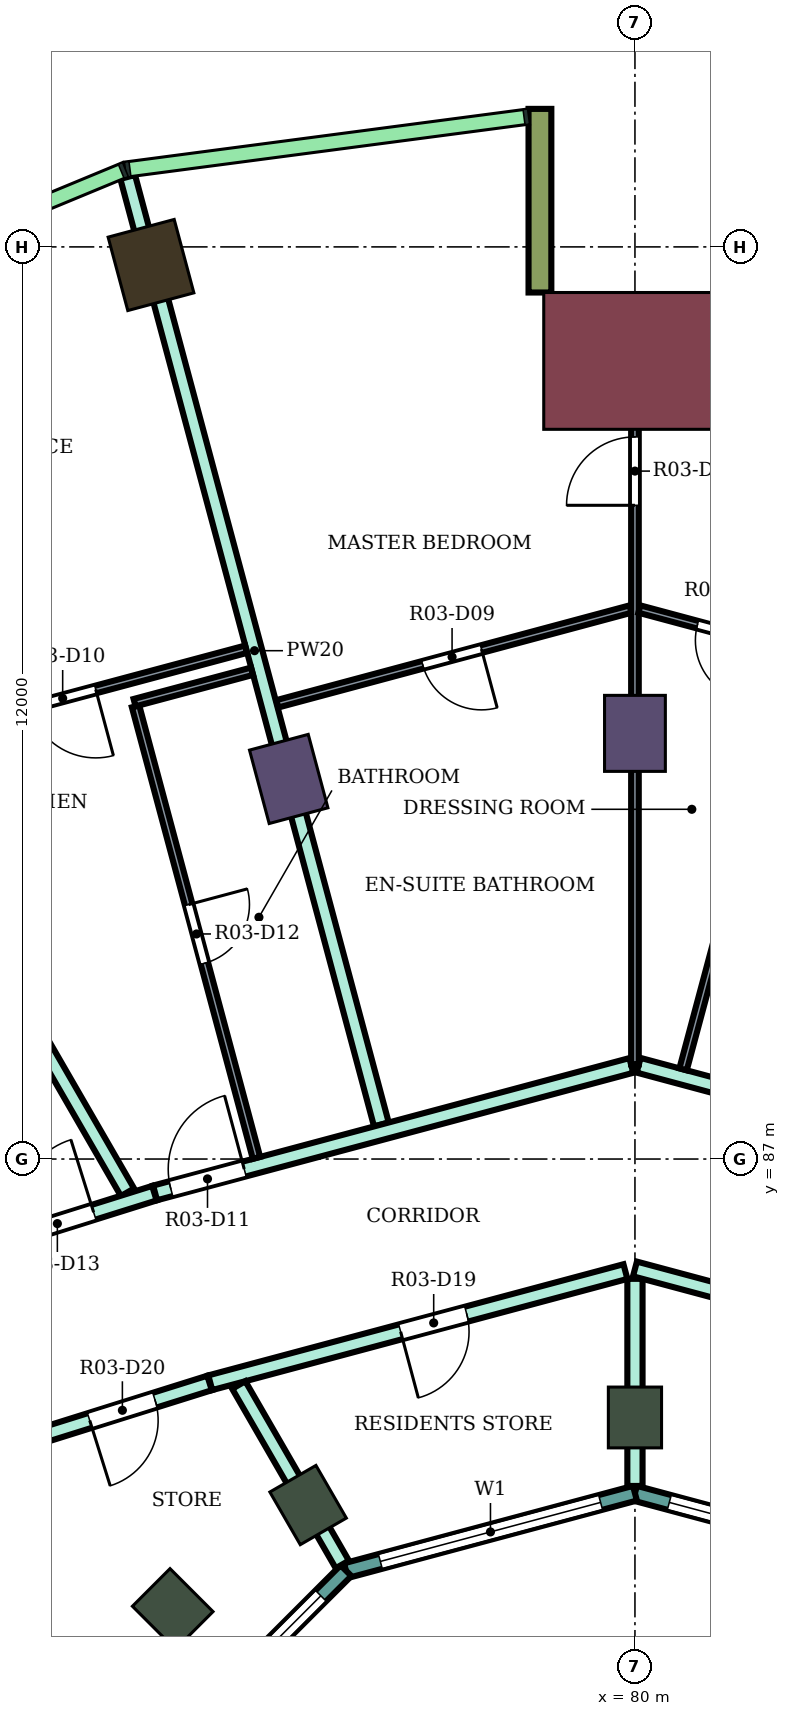
"""IFC4 building model, lengths in metres.
Left out: names, types, materials, properties, quantities, classifications, styles, units other than length and angle.
Written with IfcOpenShell. Run it as: python <this file> out.ifc"""

import sys

from ifc_helpers import new_model, si_unit, direction, frame, frame_2d, origin, origin_2d, place, context, subcontext, project, spatial, rectangle, extrude, element, fill, save


model = new_model("IFC4")
c1 = context("Model", 3, precision=1e-05, world=origin(), true_north=direction((0.0, 1.0)))
c2 = subcontext(c1, "Body", "Model", "MODEL_VIEW")
j1 = project(units=[si_unit("LENGTHUNIT", "METRE"), si_unit("PLANEANGLEUNIT", "RADIAN")], contexts=[c1])
p1 = place(None, origin())
s1 = spatial("IfcSite", under=j1, at=p1, CompositionType="ELEMENT")
p2 = place(p1, origin())
s2 = spatial("IfcBuilding", under=s1, at=p2, CompositionType="ELEMENT")
p3 = place(p2, frame((0.0, 0.0, 186.4)))
s3 = spatial("IfcBuildingStorey", under=s2, at=p3, CompositionType="ELEMENT", Elevation=186.4)
p4 = place(p3, frame((73.633, 98.762, 0.0), z_axis=(0.0, 0.0, 1.0), x_axis=(-0.258819045103, 0.965925826289, 0.0)))
e1 = element("IfcColumn", 1, at=p4, inside=s3, PredefinedType="COLUMN", context=c2, shape_type="SweptSolid", body=[
    extrude(rectangle(XDim=1.0, YDim=0.9, at=origin_2d()), origin(), (0.0, 0.0, 1.0), 4.1),
])
for number, where, z_axis, x_axis in (
    (2, (80.0, 92.6, 0.0), (0.0, 0.0, 1.0), (0.0, 1.0, 0.0)),
    (3, (75.445, 92.0, 0.0), (0.0, 0.0, 1.0), (-0.259, 0.966, 0.0)),
):
    element("IfcColumn", number, at=place(p3, frame(where, z_axis=z_axis, x_axis=x_axis)), inside=s3, PredefinedType="COLUMN", context=c2, shape_type="SweptSolid", body=[
        extrude(rectangle(XDim=1.0, YDim=0.8, at=origin_2d()), origin(), (0.0, 0.0, 1.0), 4.1),
    ])
for number, where, z_axis, x_axis in (
    (4, (80.0, 83.6, 0.0), (0.0, 0.0, 1.0), (0.0, 1.0, 0.0)),
    (5, (75.7, 82.448, 0.0), (0.0, 0.0, 1.0), (-0.5, 0.866, 0.0)),
    (6, (73.919, 81.081, 0.0), (0.0, 0.0, 1.0), (-0.707, 0.707, 0.0)),
):
    element("IfcColumn", number, at=place(p3, frame(where, z_axis=z_axis, x_axis=x_axis)), inside=s3, PredefinedType="COLUMN", context=c2, shape_type="SweptSolid", body=[
        extrude(rectangle(XDim=0.8, YDim=0.7, at=origin_2d()), origin(), (0.0, 0.0, 1.0), 4.1),
    ])
p5 = place(p3, frame((80.0, 97.5, 0.0), z_axis=(0.0, 0.0, 1.0), x_axis=(0.0, 1.0, 0.0)))
e7 = element("IfcColumn", 7, at=p5, inside=s3, PredefinedType="COLUMN", context=c2, shape_type="SweptSolid", body=[
    extrude(rectangle(XDim=1.8, YDim=2.4, at=origin_2d()), origin(), (0.0, 0.0, 1.0), 4.1),
])
p6 = place(p3, frame((78.75, 98.4, 0.0), z_axis=(0.0, 0.0, 1.0), x_axis=(0.0, 1.0, 0.0)))
e8 = element("IfcWall", 8, at=p6, inside=s3, PredefinedType="NOTDEFINED", context=c2, shape_type="SweptSolid", body=[
    extrude(rectangle(XDim=2.416, YDim=0.3, at=frame_2d((1.208, 0.0))), origin(), (0.0, 0.0, 1.0), 4.1),
])
p7 = place(p3, frame((83.802, 81.585, 0.0), z_axis=(0.0, 0.0, 1.0), x_axis=(-0.965933654434, 0.258789828301, 0.0)))
e9 = element("IfcWall", 9, at=p7, inside=s3, PredefinedType="NOTDEFINED", context=c2, shape_type="SweptSolid", body=[
    extrude(rectangle(XDim=3.936, YDim=0.2, at=frame_2d((1.968, 0.0))), origin(), (0.0, 0.0, 1.0), 4.1),
])
p8 = place(p7, frame((0.468, 0.0, 0.9)))
e10 = element("IfcOpeningElement", 10, at=p8, cuts=e9, PredefinedType="OPENING", context=c2, shape_type="SweptSolid", body=[
    extrude(rectangle(XDim=3.0, YDim=2.3, at=frame_2d((1.5, 1.15))), frame((0.0, 0.11, 0.0), z_axis=(0.0, -1.0, 0.0), x_axis=(1.0, 0.0, 0.0)), (0.0, 0.0, 1.0), 0.22),
])
p9 = place(p3, frame((80.0, 82.604, 0.0), z_axis=(0.0, 0.0, 1.0), x_axis=(-0.965933654434, -0.258789828301, 0.0)))
e11 = element("IfcWall", 11, at=p9, inside=s3, PredefinedType="NOTDEFINED", context=c2, shape_type="SweptSolid", body=[
    extrude(rectangle(XDim=3.936, YDim=0.2, at=frame_2d((1.968, 0.0))), origin(), (0.0, 0.0, 1.0), 4.1),
])
p10 = place(p9, frame((0.468, 0.0, 0.9)))
e12 = element("IfcOpeningElement", 12, at=p10, cuts=e11, PredefinedType="OPENING", context=c2, shape_type="SweptSolid", body=[
    extrude(rectangle(XDim=3.0, YDim=2.3, at=frame_2d((1.5, 1.15))), frame((0.0, 0.11, 0.0), z_axis=(0.0, -1.0, 0.0), x_axis=(1.0, 0.0, 0.0)), (0.0, 0.0, 1.0), 0.22),
])
p11 = place(p3, frame((76.198, 81.585, 0.0), z_axis=(0.0, 0.0, 1.0), x_axis=(-0.707106781187, -0.707106781187, 0.0)))
e13 = element("IfcWall", 13, at=p11, inside=s3, PredefinedType="NOTDEFINED", context=c2, shape_type="SweptSolid", body=[
    extrude(rectangle(XDim=3.936, YDim=0.2, at=frame_2d((1.968, 0.0))), origin(), (0.0, 0.0, 1.0), 4.1),
])
p12 = place(p11, frame((0.468, 0.0, 0.9)))
e14 = element("IfcOpeningElement", 14, at=p12, cuts=e13, PredefinedType="OPENING", context=c2, shape_type="SweptSolid", body=[
    extrude(rectangle(XDim=3.0, YDim=2.3, at=frame_2d((1.5, 1.15))), frame((0.0, 0.11, 0.0), z_axis=(0.0, -1.0, 0.0), x_axis=(1.0, 0.0, 0.0)), (0.0, 0.0, 1.0), 0.22),
])
p13 = place(p3, frame((67.102, 97.342, 0.0), z_axis=(0.0, 0.0, 1.0), x_axis=(0.499940938316, -0.866059500378, 0.0)))
e15 = element("IfcWall", 15, at=p13, inside=s3, PredefinedType="PARTITIONING", context=c2, shape_type="SweptSolid", body=[
    extrude(rectangle(XDim=12.446, YDim=0.2, at=frame_2d((6.223, 0.0))), origin(), (0.0, 0.0, 1.0), 3.65),
])
p14 = place(p3, frame((68.2, 84.833, 0.0), z_axis=(0.0, 0.0, 1.0), x_axis=(0.954204109499, 0.299156342762, 0.0)))
e16 = element("IfcWall", 16, at=p14, inside=s3, PredefinedType="PARTITIONING", context=c2, shape_type="SweptSolid", body=[
    extrude(rectangle(XDim=5.74, YDim=0.2, at=frame_2d((2.87, 0.0))), origin(), (0.0, 0.0, 1.0), 3.65),
])
p15 = place(p14, frame((3.903, 0.0, 0.0)))
e17 = element("IfcOpeningElement", 17, at=p15, cuts=e16, PredefinedType="OPENING", context=c2, shape_type="SweptSolid", body=[
    extrude(rectangle(XDim=1.0, YDim=2.1, at=frame_2d((0.5, 1.05))), frame((0.0, 0.11, 0.0), z_axis=(0.0, -1.0, 0.0), x_axis=(1.0, 0.0, 0.0)), (0.0, 0.0, 1.0), 0.22),
])
p16 = place(p3, frame((72.1, 83.332, 0.0), z_axis=(0.0, 0.0, 1.0), x_axis=(0.954233106619, 0.299063836383, 0.0)))
e18 = element("IfcWall", 18, at=p16, inside=s3, PredefinedType="PARTITIONING", context=c2, shape_type="SweptSolid", body=[
    extrude(rectangle(XDim=2.414, YDim=0.2, at=frame_2d((1.207, 0.0))), origin(), (0.0, 0.0, 1.0), 3.65),
])
p17 = place(p16, frame((0.762, 0.0, 0.0)))
e19 = element("IfcOpeningElement", 19, at=p17, cuts=e18, PredefinedType="OPENING", context=c2, shape_type="SweptSolid", body=[
    extrude(rectangle(XDim=0.9, YDim=2.1, at=frame_2d((0.45, 1.05))), frame((0.0, 0.11, 0.0), z_axis=(0.0, -1.0, 0.0), x_axis=(1.0, 0.0, 0.0)), (0.0, 0.0, 1.0), 0.22),
])
p18 = place(p3, frame((73.326, 99.92, 0.0), z_axis=(0.0, 0.0, 1.0), x_axis=(0.258652861824, -0.965970339643, 0.0)))
e20 = element("IfcWall", 20, at=p18, inside=s3, PredefinedType="PARTITIONING", context=c2, shape_type="SweptSolid", body=[
    extrude(rectangle(XDim=12.904, YDim=0.2, at=frame_2d((6.452, 0.0))), origin(), (0.0, 0.0, 1.0), 3.65),
])
p19 = place(p3, frame((73.687, 86.554, 0.0), z_axis=(0.0, 0.0, 1.0), x_axis=(0.965992724769, 0.258569247387, 0.0)))
e21 = element("IfcWall", 21, at=p19, inside=s3, PredefinedType="PARTITIONING", context=c2, shape_type="SweptSolid", body=[
    extrude(rectangle(XDim=6.486, YDim=0.2, at=frame_2d((3.243, 0.0))), origin(), (0.0, 0.0, 1.0), 3.65),
])
p20 = place(p19, frame((0.214, 0.0, 0.0)))
e22 = element("IfcOpeningElement", 22, at=p20, cuts=e21, PredefinedType="OPENING", context=c2, shape_type="SweptSolid", body=[
    extrude(rectangle(XDim=1.0, YDim=2.1, at=frame_2d((0.5, 1.05))), frame((0.0, 0.11, 0.0), z_axis=(0.0, -1.0, 0.0), x_axis=(1.0, 0.0, 0.0)), (0.0, 0.0, 1.0), 0.22),
])
p21 = place(p3, frame((74.413, 84.057, 0.0), z_axis=(0.0, 0.0, 1.0), x_axis=(0.965972135939, 0.258646153246, 0.0)))
e23 = element("IfcWall", 23, at=p21, inside=s3, PredefinedType="PARTITIONING", context=c2, shape_type="SweptSolid", body=[
    extrude(rectangle(XDim=5.654, YDim=0.2, at=frame_2d((2.827, 0.0))), origin(), (0.0, 0.0, 1.0), 3.65),
])
p22 = place(p21, frame((2.593, 0.0, 0.0)))
e24 = element("IfcOpeningElement", 24, at=p22, cuts=e23, PredefinedType="OPENING", context=c2, shape_type="SweptSolid", body=[
    extrude(rectangle(XDim=0.9, YDim=2.1, at=frame_2d((0.45, 1.05))), frame((0.0, 0.11, 0.0), z_axis=(0.0, -1.0, 0.0), x_axis=(1.0, 0.0, 0.0)), (0.0, 0.0, 1.0), 0.22),
])
p23 = place(p3, frame((74.788, 84.027, 0.0), z_axis=(0.0, 0.0, 1.0), x_axis=(0.499905962189, -0.866079689733, 0.0)))
e25 = element("IfcWall", 25, at=p23, inside=s3, PredefinedType="PARTITIONING", context=c2, shape_type="SweptSolid", body=[
    extrude(rectangle(XDim=2.726, YDim=0.2, at=frame_2d((1.363, 0.0))), origin(), (0.0, 0.0, 1.0), 3.65),
])
p24 = place(p3, frame((80.0, 82.699, 0.0), z_axis=(0.0, 0.0, 1.0), x_axis=(0.0, 1.0, 0.0)))
e26 = element("IfcWall", 26, at=p24, inside=s3, PredefinedType="PARTITIONING", context=c2, shape_type="SweptSolid", body=[
    extrude(rectangle(XDim=2.725, YDim=0.2, at=frame_2d((1.363, 0.0))), origin(), (0.0, 0.0, 1.0), 3.65),
])
p25 = place(p3, frame((80.0, 85.554, 0.0), z_axis=(0.0, 0.0, 1.0), x_axis=(0.965928989968, -0.258807237802, 0.0)))
e27 = element("IfcWall", 27, at=p25, inside=s3, PredefinedType="PARTITIONING", context=c2, shape_type="SweptSolid", body=[
    extrude(rectangle(XDim=5.774, YDim=0.2, at=frame_2d((2.887, 0.0))), origin(), (0.0, 0.0, 1.0), 3.65),
])
p26 = place(p25, frame((2.292, 0.0, 0.0)))
e28 = element("IfcOpeningElement", 28, at=p26, cuts=e27, PredefinedType="OPENING", context=c2, shape_type="SweptSolid", body=[
    extrude(rectangle(XDim=0.9, YDim=2.1, at=frame_2d((0.45, 1.05))), frame((0.0, 0.11, 0.0), z_axis=(0.0, -1.0, 0.0), x_axis=(1.0, 0.0, 0.0)), (0.0, 0.0, 1.0), 0.22),
])
p27 = place(p3, frame((80.048, 88.233, 0.0), z_axis=(0.0, 0.0, 1.0), x_axis=(0.965787353661, -0.259335280109, 0.0)))
e29 = element("IfcWall", 29, at=p27, inside=s3, PredefinedType="PARTITIONING", context=c2, shape_type="SweptSolid", body=[
    extrude(rectangle(XDim=6.476, YDim=0.2, at=frame_2d((3.238, 0.0))), origin(), (0.0, 0.0, 1.0), 3.65),
])
p28 = place(p27, frame((4.936, 0.0, 0.0)))
e30 = element("IfcOpeningElement", 30, at=p28, cuts=e29, PredefinedType="OPENING", context=c2, shape_type="SweptSolid", body=[
    extrude(rectangle(XDim=1.0, YDim=2.1, at=frame_2d((0.5, 1.05))), frame((0.0, 0.11, 0.0), z_axis=(0.0, -1.0, 0.0), x_axis=(1.0, 0.0, 0.0)), (0.0, 0.0, 1.0), 0.22),
])
p29 = place(p3, frame((70.067, 92.417, 0.0), z_axis=(0.0, 0.0, 1.0), x_axis=(0.965982566978, 0.258607193045, 0.0)))
e31 = element("IfcWall", 31, at=p29, inside=s3, PredefinedType="PARTITIONING", context=c2, shape_type="SweptSolid", body=[
    extrude(rectangle(XDim=4.987, YDim=0.1, at=frame_2d((2.493, 0.0))), origin(), (0.0, 0.0, 1.0), 3.65),
])
p30 = place(p29, frame((2.038, 0.0, 0.0)))
e32 = element("IfcOpeningElement", 32, at=p30, cuts=e31, PredefinedType="OPENING", context=c2, shape_type="SweptSolid", body=[
    extrude(rectangle(XDim=0.9, YDim=2.1, at=frame_2d((0.45, 1.05))), frame((0.0, 0.06, 0.0), z_axis=(0.0, -1.0, 0.0), x_axis=(1.0, 0.0, 0.0)), (0.0, 0.0, 1.0), 0.12),
])
p31 = place(p3, frame((73.43, 92.956, 0.0), z_axis=(0.0, 0.0, 1.0), x_axis=(0.258707643808, -0.965955669291, 0.0)))
e33 = element("IfcWall", 33, at=p31, inside=s3, PredefinedType="PARTITIONING", context=c2, shape_type="SweptSolid", body=[
    extrude(rectangle(XDim=6.15, YDim=0.1, at=frame_2d((3.075, 0.0))), origin(), (0.0, 0.0, 1.0), 3.65),
])
p32 = place(p31, frame((2.7, 0.0, 0.0)))
e34 = element("IfcOpeningElement", 34, at=p32, cuts=e33, PredefinedType="OPENING", context=c2, shape_type="SweptSolid", body=[
    extrude(rectangle(XDim=0.8, YDim=2.1, at=frame_2d((0.4, 1.05))), frame((0.0, 0.06, 0.0), z_axis=(0.0, -1.0, 0.0), x_axis=(1.0, 0.0, 0.0)), (0.0, 0.0, 1.0), 0.12),
])
p33 = place(p3, frame((73.417, 93.004, 0.0), z_axis=(0.0, 0.0, 1.0), x_axis=(0.966062421459, 0.258308725839, 0.0)))
e35 = element("IfcWall", 35, at=p33, inside=s3, PredefinedType="PARTITIONING", context=c2, shape_type="SweptSolid", body=[
    extrude(rectangle(XDim=1.599, YDim=0.1, at=frame_2d((0.8, 0.0))), origin(), (0.0, 0.0, 1.0), 3.65),
])
p34 = place(p3, frame((75.295, 92.989, 0.0), z_axis=(0.0, 0.0, 1.0), x_axis=(0.965829517501, 0.259178207271, 0.0)))
e36 = element("IfcWall", 36, at=p34, inside=s3, PredefinedType="PARTITIONING", context=c2, shape_type="SweptSolid", body=[
    extrude(rectangle(XDim=4.812, YDim=0.1, at=frame_2d((2.406, 0.0))), origin(), (0.0, 0.0, 1.0), 3.65),
])
p35 = place(p34, frame((1.981, 0.0, 0.0)))
e37 = element("IfcOpeningElement", 37, at=p35, cuts=e36, PredefinedType="OPENING", context=c2, shape_type="SweptSolid", body=[
    extrude(rectangle(XDim=0.8, YDim=2.1, at=frame_2d((0.4, 1.05))), frame((0.0, 0.06, 0.0), z_axis=(0.0, -1.0, 0.0), x_axis=(1.0, 0.0, 0.0)), (0.0, 0.0, 1.0), 0.12),
])
p36 = place(p3, frame((80.0, 88.246, 0.0), z_axis=(0.0, 0.0, 1.0), x_axis=(0.0, 1.0, 0.0)))
e38 = element("IfcWall", 38, at=p36, inside=s3, PredefinedType="PARTITIONING", context=c2, shape_type="SweptSolid", body=[
    extrude(rectangle(XDim=9.954, YDim=0.1, at=frame_2d((4.977, 0.0))), origin(), (0.0, 0.0, 1.0), 3.65),
])
p37 = place(p36, frame((7.354, 0.0, 0.0)))
e39 = element("IfcOpeningElement", 39, at=p37, cuts=e38, PredefinedType="OPENING", context=c2, shape_type="SweptSolid", body=[
    extrude(rectangle(XDim=0.9, YDim=2.1, at=frame_2d((0.45, 1.05))), frame((0.0, 0.06, 0.0), z_axis=(0.0, -1.0, 0.0), x_axis=(1.0, 0.0, 0.0)), (0.0, 0.0, 1.0), 0.12),
])
p38 = place(p3, frame((80.058, 94.235, 0.0), z_axis=(0.0, 0.0, 1.0), x_axis=(0.965831212389, -0.259171891173, 0.0)))
e40 = element("IfcWall", 40, at=p38, inside=s3, PredefinedType="PARTITIONING", context=c2, shape_type="SweptSolid", body=[
    extrude(rectangle(XDim=4.872, YDim=0.1, at=frame_2d((2.436, 0.0))), origin(), (0.0, 0.0, 1.0), 3.65),
])
p39 = place(p38, frame((0.792, 0.0, 0.0)))
e41 = element("IfcOpeningElement", 41, at=p39, cuts=e40, PredefinedType="OPENING", context=c2, shape_type="SweptSolid", body=[
    extrude(rectangle(XDim=0.8, YDim=2.1, at=frame_2d((0.4, 1.05))), frame((0.0, 0.06, 0.0), z_axis=(0.0, -1.0, 0.0), x_axis=(1.0, 0.0, 0.0)), (0.0, 0.0, 1.0), 0.12),
])
p40 = place(p3, frame((80.633, 88.18, 0.0), z_axis=(0.0, 0.0, 1.0), x_axis=(0.25898304477, 0.965881867788, 0.0)))
e42 = element("IfcWall", 42, at=p40, inside=s3, PredefinedType="PARTITIONING", context=c2, shape_type="SweptSolid", body=[
    extrude(rectangle(XDim=5.65, YDim=0.1, at=frame_2d((2.825, 0.0))), origin(), (0.0, 0.0, 1.0), 3.65),
])
p41 = place(p8, origin())
e43 = element("IfcWindow", 43, at=p41, inside=s3, PartitioningType="SINGLE_PANEL", PredefinedType="WINDOW", context=c2, shape_type="SweptSolid", body=[
    extrude(rectangle(XDim=3.0, YDim=2.3, at=frame_2d((1.5, 1.15))), frame((0.0, 0.03, 0.0), z_axis=(0.0, -1.0, 0.0), x_axis=(1.0, 0.0, 0.0)), (0.0, 0.0, 1.0), 0.06),
])
fill(e10, e43)
p42 = place(p10, origin())
e44 = element("IfcWindow", 44, at=p42, inside=s3, PartitioningType="SINGLE_PANEL", PredefinedType="WINDOW", context=c2, shape_type="SweptSolid", body=[
    extrude(rectangle(XDim=3.0, YDim=2.3, at=frame_2d((1.5, 1.15))), frame((0.0, 0.03, 0.0), z_axis=(0.0, -1.0, 0.0), x_axis=(1.0, 0.0, 0.0)), (0.0, 0.0, 1.0), 0.06),
])
fill(e12, e44)
p43 = place(p12, origin())
e45 = element("IfcWindow", 45, at=p43, inside=s3, PartitioningType="SINGLE_PANEL", PredefinedType="WINDOW", context=c2, shape_type="SweptSolid", body=[
    extrude(rectangle(XDim=3.0, YDim=2.3, at=frame_2d((1.5, 1.15))), frame((0.0, 0.03, 0.0), z_axis=(0.0, -1.0, 0.0), x_axis=(1.0, 0.0, 0.0)), (0.0, 0.0, 1.0), 0.06),
])
fill(e14, e45)
p44 = place(p39, frame((0.8, 0.0, 0.0), z_axis=(0.0, 0.0, 1.0), x_axis=(-1.0, 0.0, 0.0)))
e46 = element("IfcDoor", 46, at=p44, inside=s3, OperationType="SINGLE_SWING_LEFT", PredefinedType="DOOR", context=c2, shape_type="SweptSolid", body=[
    extrude(rectangle(XDim=0.8, YDim=2.1, at=frame_2d((0.4, 1.05))), frame((0.0, 0.025, 0.0), z_axis=(0.0, -1.0, 0.0), x_axis=(1.0, 0.0, 0.0)), (0.0, 0.0, 1.0), 0.05),
])
fill(e41, e46)
p45 = place(p37, origin())
e47 = element("IfcDoor", 47, at=p45, inside=s3, OperationType="SINGLE_SWING_LEFT", PredefinedType="DOOR", context=c2, shape_type="SweptSolid", body=[
    extrude(rectangle(XDim=0.9, YDim=2.1, at=frame_2d((0.45, 1.05))), frame((0.0, 0.025, 0.0), z_axis=(0.0, -1.0, 0.0), x_axis=(1.0, 0.0, 0.0)), (0.0, 0.0, 1.0), 0.05),
])
fill(e39, e47)
p46 = place(p35, frame((0.8, 0.0, 0.0), z_axis=(0.0, 0.0, 1.0), x_axis=(-1.0, 0.0, 0.0)))
e48 = element("IfcDoor", 48, at=p46, inside=s3, OperationType="SINGLE_SWING_LEFT", PredefinedType="DOOR", context=c2, shape_type="SweptSolid", body=[
    extrude(rectangle(XDim=0.8, YDim=2.1, at=frame_2d((0.4, 1.05))), frame((0.0, 0.025, 0.0), z_axis=(0.0, -1.0, 0.0), x_axis=(1.0, 0.0, 0.0)), (0.0, 0.0, 1.0), 0.05),
])
fill(e37, e48)
p47 = place(p30, frame((0.9, 0.0, 0.0), z_axis=(0.0, 0.0, 1.0), x_axis=(-1.0, 0.0, 0.0)))
e49 = element("IfcDoor", 49, at=p47, inside=s3, OperationType="SINGLE_SWING_LEFT", PredefinedType="DOOR", context=c2, shape_type="SweptSolid", body=[
    extrude(rectangle(XDim=0.9, YDim=2.1, at=frame_2d((0.45, 1.05))), frame((0.0, 0.025, 0.0), z_axis=(0.0, -1.0, 0.0), x_axis=(1.0, 0.0, 0.0)), (0.0, 0.0, 1.0), 0.05),
])
fill(e32, e49)
p48 = place(p20, origin())
e50 = element("IfcDoor", 50, at=p48, inside=s3, OperationType="SINGLE_SWING_RIGHT", PredefinedType="DOOR", context=c2, shape_type="SweptSolid", body=[
    extrude(rectangle(XDim=1.0, YDim=2.1, at=frame_2d((0.5, 1.05))), frame((0.0, 0.025, 0.0), z_axis=(0.0, -1.0, 0.0), x_axis=(1.0, 0.0, 0.0)), (0.0, 0.0, 1.0), 0.05),
])
fill(e22, e50)
p49 = place(p32, origin())
e51 = element("IfcDoor", 51, at=p49, inside=s3, OperationType="SINGLE_SWING_LEFT", PredefinedType="DOOR", context=c2, shape_type="SweptSolid", body=[
    extrude(rectangle(XDim=0.8, YDim=2.1, at=frame_2d((0.4, 1.05))), frame((0.0, 0.025, 0.0), z_axis=(0.0, -1.0, 0.0), x_axis=(1.0, 0.0, 0.0)), (0.0, 0.0, 1.0), 0.05),
])
fill(e34, e51)
p50 = place(p15, origin())
e52 = element("IfcDoor", 52, at=p50, inside=s3, OperationType="SINGLE_SWING_RIGHT", PredefinedType="DOOR", context=c2, shape_type="SweptSolid", body=[
    extrude(rectangle(XDim=1.0, YDim=2.1, at=frame_2d((0.5, 1.05))), frame((0.0, 0.025, 0.0), z_axis=(0.0, -1.0, 0.0), x_axis=(1.0, 0.0, 0.0)), (0.0, 0.0, 1.0), 0.05),
])
fill(e17, e52)
p51 = place(p22, frame((0.9, 0.0, 0.0), z_axis=(0.0, 0.0, 1.0), x_axis=(-1.0, 0.0, 0.0)))
e53 = element("IfcDoor", 53, at=p51, inside=s3, OperationType="SINGLE_SWING_RIGHT", PredefinedType="DOOR", context=c2, shape_type="SweptSolid", body=[
    extrude(rectangle(XDim=0.9, YDim=2.1, at=frame_2d((0.45, 1.05))), frame((0.0, 0.025, 0.0), z_axis=(0.0, -1.0, 0.0), x_axis=(1.0, 0.0, 0.0)), (0.0, 0.0, 1.0), 0.05),
])
fill(e24, e53)
p52 = place(p17, frame((0.9, 0.0, 0.0), z_axis=(0.0, 0.0, 1.0), x_axis=(-1.0, 0.0, 0.0)))
e54 = element("IfcDoor", 54, at=p52, inside=s3, OperationType="SINGLE_SWING_RIGHT", PredefinedType="DOOR", context=c2, shape_type="SweptSolid", body=[
    extrude(rectangle(XDim=0.9, YDim=2.1, at=frame_2d((0.45, 1.05))), frame((0.0, 0.025, 0.0), z_axis=(0.0, -1.0, 0.0), x_axis=(1.0, 0.0, 0.0)), (0.0, 0.0, 1.0), 0.05),
])
fill(e19, e54)
save(model, sys.argv[1])
